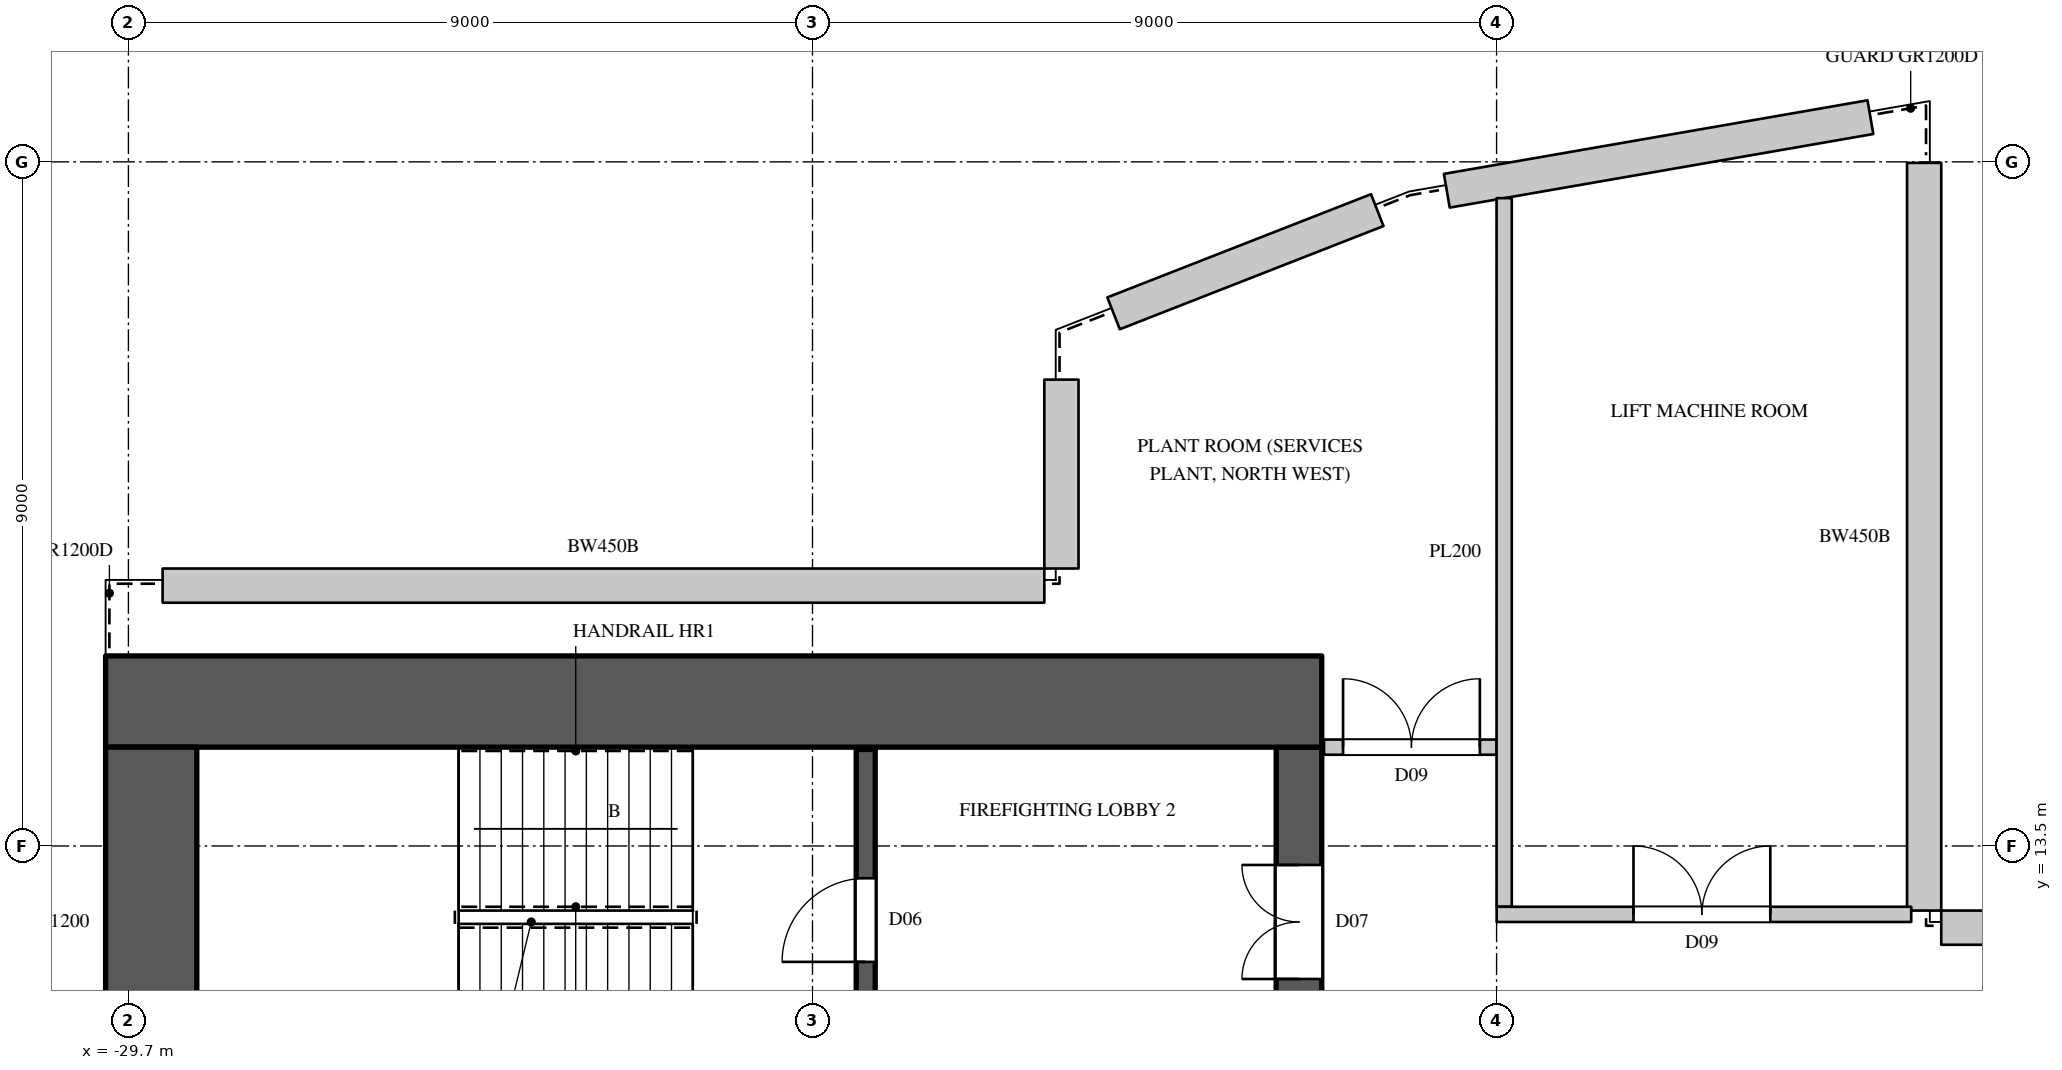
"""IFC4 building model, lengths in metres.
Left out: names, types, materials, properties, quantities, classifications, styles, units other than length and angle.
Written with IfcOpenShell. Run it as: python <this file> out.ifc"""

import sys

from ifc_helpers import new_model, si_unit, direction, frame, frame_2d, origin, place, context, subcontext, project, spatial, rectangle, extrude, element, fill, save


model = new_model("IFC4")
c1 = context("Model", 3, precision=1e-05, world=origin(), true_north=direction((0.0, 1.0)))
c2 = subcontext(c1, "Body", "Model", "MODEL_VIEW")
j1 = project(units=[si_unit("LENGTHUNIT", "METRE"), si_unit("PLANEANGLEUNIT", "RADIAN")], contexts=[c1])
p1 = place(None, origin())
s1 = spatial("IfcSite", under=j1, at=p1, CompositionType="ELEMENT")
p2 = place(p1, origin())
s2 = spatial("IfcBuilding", under=s1, at=p2, CompositionType="ELEMENT")
p3 = place(p2, frame((0.0, 0.0, 351.0)))
s3 = spatial("IfcBuildingStorey", under=s2, at=p3, CompositionType="ELEMENT", Elevation=351.0)
p4 = place(p3, frame((7.85, 12.425, 0.0), z_axis=(0.0, 0.0, 1.0), x_axis=(-1.0, 0.0, 0.0)))
e1 = element("IfcWall", 1, at=p4, inside=s3, PredefinedType="SOLIDWALL", context=c2, shape_type="SweptSolid", body=[
    extrude(rectangle(XDim=13.7, YDim=0.45, at=frame_2d((6.85, 0.0))), origin(), (0.0, 0.0, 1.0), 3.7),
])
p5 = place(p3, frame((-6.075, 12.65, 0.0), z_axis=(0.0, 0.0, 1.0), x_axis=(0.0, 1.0, 0.0)))
e2 = element("IfcWall", 2, at=p5, inside=s3, PredefinedType="SOLIDWALL", context=c2, shape_type="SweptSolid", body=[
    extrude(rectangle(XDim=9.837, YDim=0.45, at=frame_2d((4.918, 0.0))), origin(), (0.0, 0.0, 1.0), 3.7),
])
p6 = place(p3, frame((-6.782, 23.088, 0.0), z_axis=(0.0, 0.0, 1.0), x_axis=(-0.985240251318, -0.171177239091, 0.0)))
e3 = element("IfcWall", 3, at=p6, inside=s3, PredefinedType="SOLIDWALL", context=c2, shape_type="SweptSolid", body=[
    extrude(rectangle(XDim=5.656, YDim=0.45, at=frame_2d((2.828, 0.0))), origin(), (0.0, 0.0, 1.0), 3.7),
])
p7 = place(p3, frame((-13.27, 21.865, 0.0), z_axis=(0.0, 0.0, 1.0), x_axis=(-0.931207968362, -0.364488298384, 0.0)))
e4 = element("IfcWall", 4, at=p7, inside=s3, PredefinedType="SOLIDWALL", context=c2, shape_type="SweptSolid", body=[
    extrude(rectangle(XDim=3.726, YDim=0.45, at=frame_2d((1.863, 0.0))), origin(), (0.0, 0.0, 1.0), 3.7),
])
p8 = place(p3, frame((-17.425, 19.635, 0.0), z_axis=(0.0, 0.0, 1.0), x_axis=(0.0, -1.0, 0.0)))
e5 = element("IfcWall", 5, at=p8, inside=s3, PredefinedType="SOLIDWALL", context=c2, shape_type="SweptSolid", body=[
    extrude(rectangle(XDim=2.485, YDim=0.45, at=frame_2d((1.243, 0.0))), origin(), (0.0, 0.0, 1.0), 3.7),
])
p9 = place(p3, frame((-17.65, 16.925, 0.0), z_axis=(0.0, 0.0, 1.0), x_axis=(-1.0, 0.0, 0.0)))
e6 = element("IfcWall", 6, at=p9, inside=s3, PredefinedType="SOLIDWALL", context=c2, shape_type="SweptSolid", body=[
    extrude(rectangle(XDim=11.6, YDim=0.45, at=frame_2d((5.8, 0.0))), origin(), (0.0, 0.0, 1.0), 3.7),
])
p10 = place(p3, frame((-30.0, 15.4, 0.0), z_axis=(0.0, 0.0, 1.0), x_axis=(1.0, 0.0, 0.0)))
e7 = element("IfcWall", 7, at=p10, inside=s3, PredefinedType="SHEAR", context=c2, shape_type="SweptSolid", body=[
    extrude(rectangle(XDim=16.0, YDim=1.2, at=frame_2d((8.0, 0.0))), origin(), (0.0, 0.0, 1.0), 4.0),
])
p11 = place(p3, frame((-14.3, -14.8, 0.0), z_axis=(0.0, 0.0, 1.0), x_axis=(0.0, 1.0, 0.0)))
e8 = element("IfcWall", 8, at=p11, inside=s3, PredefinedType="SHEAR", context=c2, shape_type="SweptSolid", body=[
    extrude(rectangle(XDim=29.6, YDim=0.6, at=frame_2d((14.8, 0.0))), origin(), (0.0, 0.0, 1.0), 4.0),
])
p12 = place(p11, frame((1.55, 0.0, 0.0)))
e9 = element("IfcOpeningElement", 9, at=p12, cuts=e8, PredefinedType="OPENING", context=c2, shape_type="SweptSolid", body=[
    extrude(rectangle(XDim=1.5, YDim=2.4, at=frame_2d((0.75, 1.2))), frame((0.0, 0.31, 0.0), z_axis=(0.0, -1.0, 0.0), x_axis=(1.0, 0.0, 0.0)), (0.0, 0.0, 1.0), 0.62),
])
p13 = place(p11, frame((26.55, 0.0, 0.0)))
e10 = element("IfcOpeningElement", 10, at=p13, cuts=e8, PredefinedType="OPENING", context=c2, shape_type="SweptSolid", body=[
    extrude(rectangle(XDim=1.5, YDim=2.4, at=frame_2d((0.75, 1.2))), frame((0.0, 0.31, 0.0), z_axis=(0.0, -1.0, 0.0), x_axis=(1.0, 0.0, 0.0)), (0.0, 0.0, 1.0), 0.62),
])
p14 = place(p11, frame((8.45, 0.0, 0.0)))
e11 = element("IfcOpeningElement", 11, at=p14, cuts=e8, PredefinedType="OPENING", context=c2, shape_type="SweptSolid", body=[
    extrude(rectangle(XDim=1.5, YDim=2.4, at=frame_2d((0.75, 1.2))), frame((0.0, 0.31, 0.0), z_axis=(0.0, -1.0, 0.0), x_axis=(1.0, 0.0, 0.0)), (0.0, 0.0, 1.0), 0.62),
])
p15 = place(p11, frame((19.65, 0.0, 0.0)))
e12 = element("IfcOpeningElement", 12, at=p15, cuts=e8, PredefinedType="OPENING", context=c2, shape_type="SweptSolid", body=[
    extrude(rectangle(XDim=1.5, YDim=2.4, at=frame_2d((0.75, 1.2))), frame((0.0, 0.31, 0.0), z_axis=(0.0, -1.0, 0.0), x_axis=(1.0, 0.0, 0.0)), (0.0, 0.0, 1.0), 0.62),
])
p16 = place(p11, frame((14.5, 0.0, 0.0)))
e13 = element("IfcOpeningElement", 13, at=p16, cuts=e8, PredefinedType="OPENING", context=c2, shape_type="SweptSolid", body=[
    extrude(rectangle(XDim=0.6, YDim=2.0, at=frame_2d((0.3, 1.0))), frame((0.0, 0.31, 0.0), z_axis=(0.0, -1.0, 0.0), x_axis=(1.0, 0.0, 0.0)), (0.0, 0.0, 1.0), 0.62),
])
p17 = place(p3, frame((-29.4, 10.2, 0.0), z_axis=(0.0, 0.0, 1.0), x_axis=(0.0, 1.0, 0.0)))
e14 = element("IfcWall", 14, at=p17, inside=s3, PredefinedType="SHEAR", context=c2, shape_type="SweptSolid", body=[
    extrude(rectangle(XDim=4.6, YDim=1.2, at=frame_2d((2.3, 0.0))), origin(), (0.0, 0.0, 1.0), 4.0),
])
p18 = place(p3, frame((-13.97, 14.8, 0.0), z_axis=(0.0, 0.0, 1.0), x_axis=(1.0, 0.0, 0.0)))
e15 = element("IfcWall", 15, at=p18, inside=s3, PredefinedType="PARTITIONING", context=c2, shape_type="SweptSolid", body=[
    extrude(rectangle(XDim=2.27, YDim=0.2, at=frame_2d((1.135, 0.0))), origin(), (0.0, 0.0, 1.0), 3.598),
])
p19 = place(p18, frame((0.25, 0.0, 0.0)))
e16 = element("IfcOpeningElement", 16, at=p19, cuts=e15, PredefinedType="OPENING", context=c2, shape_type="SweptSolid", body=[
    extrude(rectangle(XDim=1.8, YDim=2.4, at=frame_2d((0.9, 1.2))), frame((0.0, 0.11, 0.0), z_axis=(0.0, -1.0, 0.0), x_axis=(1.0, 0.0, 0.0)), (0.0, 0.0, 1.0), 0.22),
])
p20 = place(p3, frame((-11.6, 12.701, 0.0), z_axis=(0.0, 0.0, 1.0), x_axis=(0.0, 1.0, 0.0)))
e17 = element("IfcWall", 17, at=p20, inside=s3, PredefinedType="PARTITIONING", context=c2, shape_type="SweptSolid", body=[
    extrude(rectangle(XDim=9.322, YDim=0.2, at=frame_2d((4.661, 0.0))), origin(), (0.0, 0.0, 1.0), 3.598),
])
p21 = place(p3, frame((-11.699, 12.6, 0.0), z_axis=(0.0, 0.0, 1.0), x_axis=(1.0, 0.0, 0.0)))
e18 = element("IfcWall", 18, at=p21, inside=s3, PredefinedType="PARTITIONING", context=c2, shape_type="SweptSolid", body=[
    extrude(rectangle(XDim=5.454, YDim=0.2, at=frame_2d((2.727, 0.0))), origin(), (0.0, 0.0, 1.0), 3.598),
])
p22 = place(p21, frame((1.8, 0.0, 0.0)))
e19 = element("IfcOpeningElement", 19, at=p22, cuts=e18, PredefinedType="OPENING", context=c2, shape_type="SweptSolid", body=[
    extrude(rectangle(XDim=1.8, YDim=2.4, at=frame_2d((0.9, 1.2))), frame((0.0, 0.11, 0.0), z_axis=(0.0, -1.0, 0.0), x_axis=(1.0, 0.0, 0.0)), (0.0, 0.0, 1.0), 0.22),
])
p23 = place(p3, frame((-20.0, 10.325, 0.0), z_axis=(0.0, 0.0, 1.0), x_axis=(0.0, 1.0, 0.0)))
e20 = element("IfcWall", 20, at=p23, inside=s3, PredefinedType="SHEAR", context=c2, shape_type="SweptSolid", body=[
    extrude(rectangle(XDim=4.445, YDim=0.25, at=frame_2d((2.223, 0.0))), origin(), (0.0, 0.0, 1.0), 3.598),
])
p24 = place(p23, frame((1.65, 0.0, 0.0)))
e21 = element("IfcOpeningElement", 21, at=p24, cuts=e20, PredefinedType="OPENING", context=c2, shape_type="SweptSolid", body=[
    extrude(rectangle(XDim=1.1, YDim=2.2, at=frame_2d((0.55, 1.1))), frame((0.0, 0.135, 0.0), z_axis=(0.0, -1.0, 0.0), x_axis=(1.0, 0.0, 0.0)), (0.0, 0.0, 1.0), 0.27),
])
p25 = place(p24, origin())
e22 = element("IfcDoor", 22, at=p25, inside=s3, OperationType="SINGLE_SWING_LEFT", PredefinedType="DOOR", context=c2, shape_type="SweptSolid", body=[
    extrude(rectangle(XDim=1.1, YDim=2.2, at=frame_2d((0.55, 1.1))), frame((0.0, 0.025, 0.0), z_axis=(0.0, -1.0, 0.0), x_axis=(1.0, 0.0, 0.0)), (0.0, 0.0, 1.0), 0.05),
])
fill(e21, e22)
p26 = place(p22, origin())
e23 = element("IfcDoor", 23, at=p26, inside=s3, OperationType="DOUBLE_DOOR_SINGLE_SWING", PredefinedType="DOOR", context=c2, shape_type="SweptSolid", body=[
    extrude(rectangle(XDim=1.8, YDim=2.4, at=frame_2d((0.9, 1.2))), frame((0.0, 0.025, 0.0), z_axis=(0.0, -1.0, 0.0), x_axis=(1.0, 0.0, 0.0)), (0.0, 0.0, 1.0), 0.05),
])
fill(e19, e23)
p27 = place(p19, origin())
e24 = element("IfcDoor", 24, at=p27, inside=s3, OperationType="DOUBLE_DOOR_SINGLE_SWING", PredefinedType="DOOR", context=c2, shape_type="SweptSolid", body=[
    extrude(rectangle(XDim=1.8, YDim=2.4, at=frame_2d((0.9, 1.2))), frame((0.0, 0.025, 0.0), z_axis=(0.0, -1.0, 0.0), x_axis=(1.0, 0.0, 0.0)), (0.0, 0.0, 1.0), 0.05),
])
fill(e16, e24)
p28 = place(p13, origin())
e25 = element("IfcDoor", 25, at=p28, inside=s3, OperationType="DOUBLE_DOOR_SINGLE_SWING", PredefinedType="DOOR", context=c2, shape_type="SweptSolid", body=[
    extrude(rectangle(XDim=1.5, YDim=2.4, at=frame_2d((0.75, 1.2))), frame((0.0, 0.295, 0.0), z_axis=(0.0, -1.0, 0.0), x_axis=(1.0, 0.0, 0.0)), (0.0, 0.0, 1.0), 0.05),
])
fill(e10, e25)
save(model, sys.argv[1])
